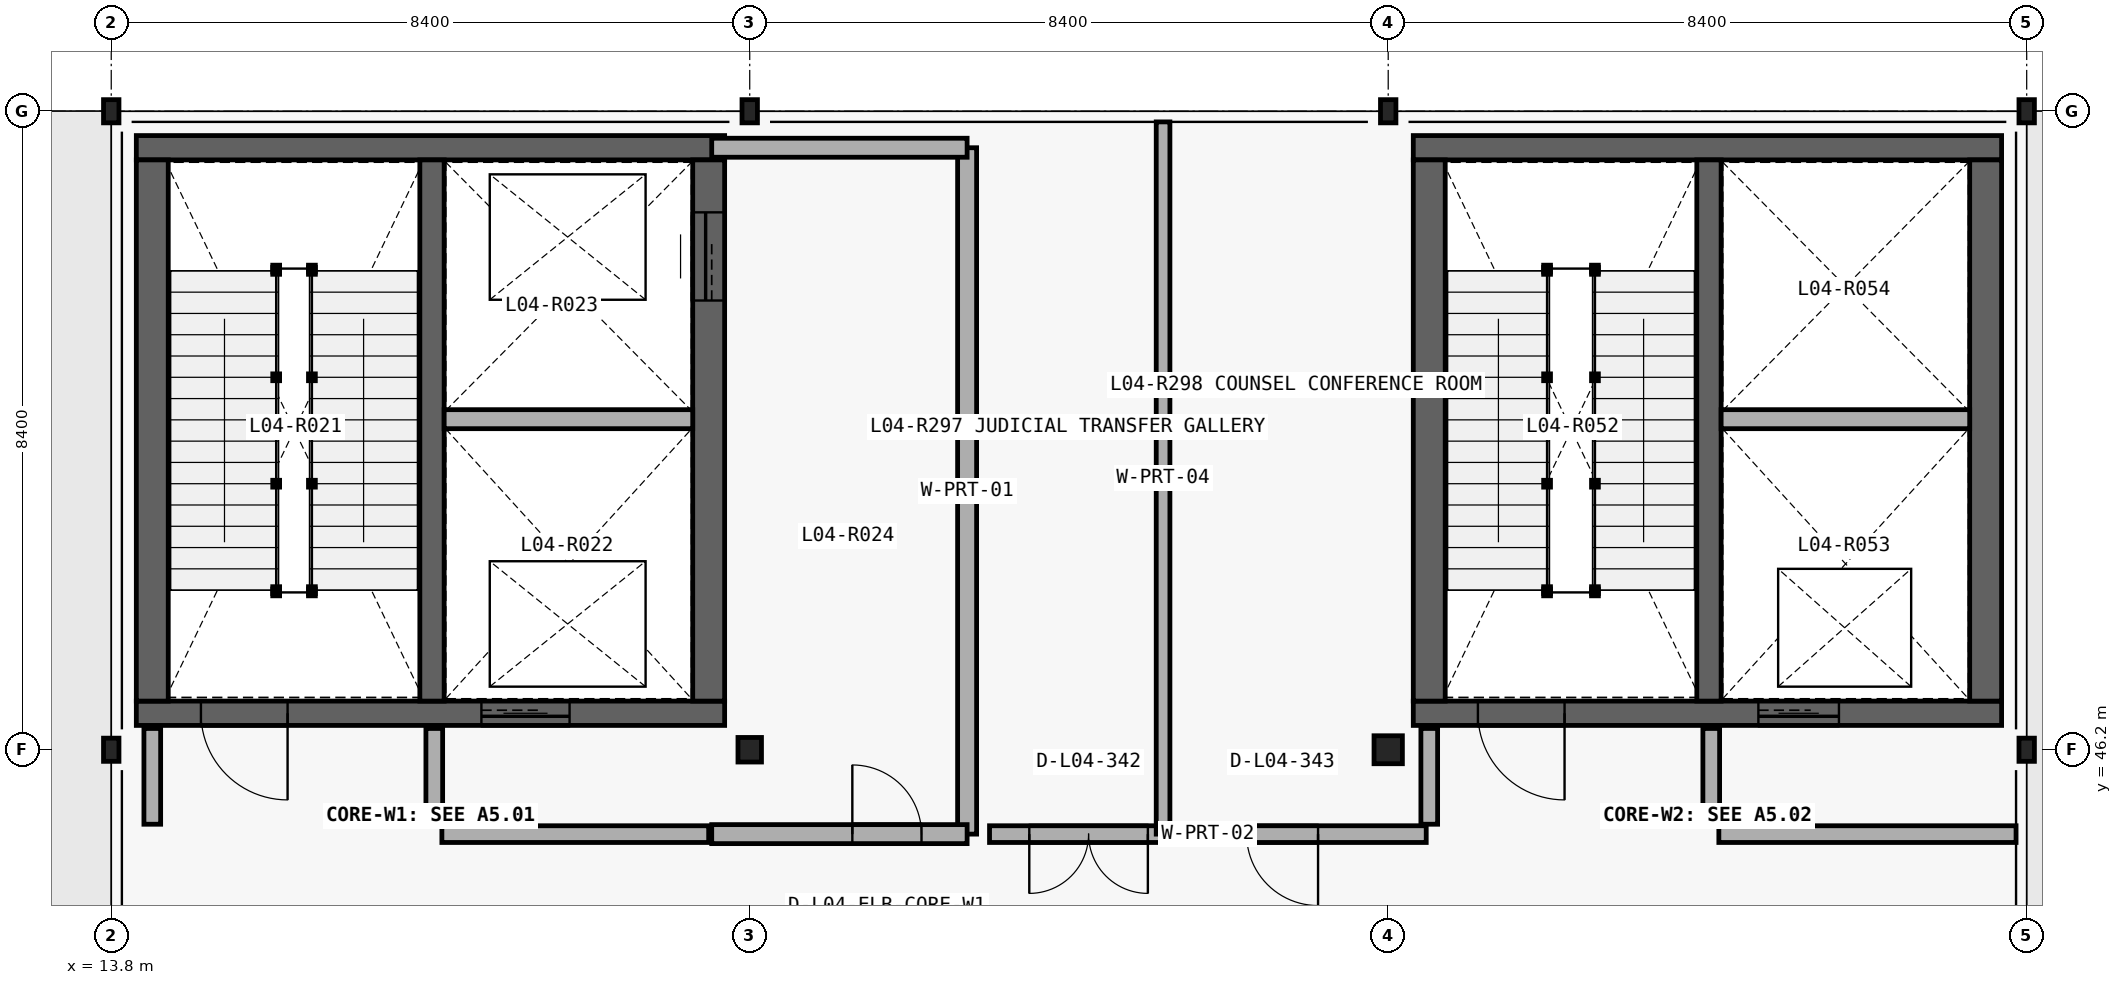
"""IFC4 building model, lengths in metres.
Left out: names, types, materials, properties, quantities, classifications, styles, units other than length and angle.
Written with IfcOpenShell. Run it as: python <this file> out.ifc"""

import sys

from ifc_helpers import new_model, si_unit, direction, frame, frame_2d, origin_with_axes, origin_2d_with_axis, place, context, subcontext, project, spatial, rectangle, hollow_rectangle, i_section, extrude, element, fill, save


model = new_model("IFC4")
c1 = context("Model", 3, precision=1e-05, world=origin_with_axes(), true_north=direction((0.0, 1.0)))
c2 = subcontext(c1, "Body", "Model", "MODEL_VIEW")
j1 = project(units=[si_unit("LENGTHUNIT", "METRE"), si_unit("PLANEANGLEUNIT", "RADIAN")], contexts=[c1])
p1 = place(None, origin_with_axes())
s1 = spatial("IfcSite", under=j1, at=p1, CompositionType="ELEMENT")
p2 = place(p1, origin_with_axes())
s2 = spatial("IfcBuilding", under=s1, at=p2, CompositionType="ELEMENT")
p3 = place(p2, frame((0.0, 0.0, 20.4), z_axis=(0.0, 0.0, 1.0), x_axis=(1.0, 0.0, 0.0)))
s3 = spatial("IfcBuildingStorey", under=s2, at=p3, CompositionType="ELEMENT", Elevation=20.4)
p4 = place(None, frame((14.13, 46.68, 20.4), z_axis=(0.0, 0.0, 1.0), x_axis=(1.0, 0.0, 0.0)))
e1 = element("IfcWall", 1, at=p4, inside=s3, PredefinedType="SHEAR", context=c2, shape_type="SweptSolid", body=[
    extrude(rectangle(XDim=7.74, YDim=0.32, at=frame_2d((3.87, 0.0), x_axis=(1.0, 0.0))), origin_with_axes(), (0.0, 0.0, 1.0), 4.5),
])
p5 = place(None, frame((15.55, 46.68, 20.4), z_axis=(0.0, 0.0, 1.0), x_axis=(1.0, 0.0, 0.0)))
e2 = element("IfcOpeningElement", 2, at=p5, cuts=e1, PredefinedType="OPENING", context=c2, shape_type="SweptSolid", body=[
    extrude(rectangle(XDim=1.14, YDim=2.18, at=frame_2d((0.0, 1.09), x_axis=(1.0, 0.0))), frame((0.0, 0.17, 0.0), z_axis=(0.0, -1.0, 0.0), x_axis=(1.0, 0.0, 0.0)), (0.0, 0.0, 1.0), 0.34),
])
p6 = place(None, frame((19.25, 46.68, 20.4), z_axis=(0.0, 0.0, 1.0), x_axis=(1.0, 0.0, 0.0)))
e3 = element("IfcOpeningElement", 3, at=p6, cuts=e1, PredefinedType="OPENING", context=c2, shape_type="SweptSolid", body=[
    extrude(rectangle(XDim=1.16, YDim=2.2, at=frame_2d((0.0, 1.1), x_axis=(1.0, 0.0))), frame((0.0, 0.17, 0.0), z_axis=(0.0, -1.0, 0.0), x_axis=(1.0, 0.0, 0.0)), (0.0, 0.0, 1.0), 0.34),
])
p7 = place(None, frame((21.87, 54.12, 20.4), z_axis=(0.0, 0.0, 1.0), x_axis=(-1.0, 0.0, 0.0)))
e4 = element("IfcWall", 4, at=p7, inside=s3, PredefinedType="SHEAR", context=c2, shape_type="SweptSolid", body=[
    extrude(rectangle(XDim=7.74, YDim=0.32, at=frame_2d((3.87, 0.0), x_axis=(1.0, 0.0))), origin_with_axes(), (0.0, 0.0, 1.0), 4.5),
])
p8 = place(None, frame((21.66, 46.84, 20.4), z_axis=(0.0, 0.0, 1.0), x_axis=(0.0, 1.0, 0.0)))
e5 = element("IfcWall", 5, at=p8, inside=s3, PredefinedType="SHEAR", context=c2, shape_type="SweptSolid", body=[
    extrude(rectangle(XDim=7.12, YDim=0.42, at=frame_2d((3.56, 0.0), x_axis=(1.0, 0.0))), origin_with_axes(), (0.0, 0.0, 1.0), 4.5),
])
p9 = place(None, frame((21.66, 52.69, 20.4), z_axis=(0.0, 0.0, 1.0), x_axis=(0.0, 1.0, 0.0)))
e6 = element("IfcOpeningElement", 6, at=p9, cuts=e5, PredefinedType="OPENING", context=c2, shape_type="SweptSolid", body=[
    extrude(rectangle(XDim=1.16, YDim=2.2, at=frame_2d((0.0, 1.1), x_axis=(1.0, 0.0))), frame((0.0, 0.22, 0.0), z_axis=(0.0, -1.0, 0.0), x_axis=(1.0, 0.0, 0.0)), (0.0, 0.0, 1.0), 0.44),
])
p10 = place(None, frame((14.34, 53.96, 20.4), z_axis=(0.0, 0.0, 1.0), x_axis=(0.0, -1.0, 0.0)))
e7 = element("IfcWall", 7, at=p10, inside=s3, PredefinedType="SHEAR", context=c2, shape_type="SweptSolid", body=[
    extrude(rectangle(XDim=7.12, YDim=0.42, at=frame_2d((3.56, 0.0), x_axis=(1.0, 0.0))), origin_with_axes(), (0.0, 0.0, 1.0), 4.5),
])
p11 = place(None, frame((18.02, 46.84, 20.4), z_axis=(0.0, 0.0, 1.0), x_axis=(0.0, 1.0, 0.0)))
e8 = element("IfcWall", 8, at=p11, inside=s3, PredefinedType="SHEAR", context=c2, shape_type="SweptSolid", body=[
    extrude(rectangle(XDim=7.12, YDim=0.32, at=frame_2d((3.56, 0.0), x_axis=(1.0, 0.0))), origin_with_axes(), (0.0, 0.0, 1.0), 4.5),
])
p12 = place(None, frame((18.18, 50.549, 20.4), z_axis=(0.0, 0.0, 1.0), x_axis=(1.0, 0.0, 0.0)))
e9 = element("IfcWall", 9, at=p12, inside=s3, PredefinedType="PARTITIONING", context=c2, shape_type="SweptSolid", body=[
    extrude(rectangle(XDim=3.27, YDim=0.25, at=frame_2d((1.635, 0.0), x_axis=(1.0, 0.0))), origin_with_axes(), (0.0, 0.0, 1.0), 4.18),
])
p13 = place(None, frame((25.06, 45.09, 20.4), z_axis=(0.0, 0.0, 1.0), x_axis=(0.0, 1.0, 0.0)))
e10 = element("IfcWall", 10, at=p13, inside=s3, PredefinedType="PARTITIONING", context=c2, shape_type="SweptSolid", body=[
    extrude(rectangle(XDim=9.03, YDim=0.25, at=frame_2d((4.515, 0.0), x_axis=(1.0, 0.0))), origin_with_axes(), (0.0, 0.0, 1.0), 4.18),
])
p14 = place(None, frame((21.7, 54.12, 20.4), z_axis=(0.0, 0.0, 1.0), x_axis=(1.0, 0.0, 0.0)))
e11 = element("IfcWall", 11, at=p14, inside=s3, PredefinedType="PARTITIONING", context=c2, shape_type="SweptSolid", body=[
    extrude(rectangle(XDim=3.36, YDim=0.25, at=frame_2d((1.68, 0.0), x_axis=(1.0, 0.0))), origin_with_axes(), (0.0, 0.0, 1.0), 4.18),
])
p15 = place(None, frame((21.7, 45.09, 20.4), z_axis=(0.0, 0.0, 1.0), x_axis=(1.0, 0.0, 0.0)))
e12 = element("IfcWall", 12, at=p15, inside=s3, PredefinedType="PARTITIONING", context=c2, shape_type="SweptSolid", body=[
    extrude(rectangle(XDim=3.36, YDim=0.25, at=frame_2d((1.68, 0.0), x_axis=(1.0, 0.0))), origin_with_axes(), (0.0, 0.0, 1.0), 4.18),
])
p16 = place(None, frame((24.005, 45.09, 20.4), z_axis=(0.0, 0.0, 1.0), x_axis=(1.0, 0.0, 0.0)))
e13 = element("IfcOpeningElement", 13, at=p16, cuts=e12, PredefinedType="OPENING", context=c2, shape_type="SweptSolid", body=[
    extrude(rectangle(XDim=0.91, YDim=2.12, at=frame_2d((0.0, 1.06), x_axis=(1.0, 0.0))), frame((0.0, 0.135, 0.0), z_axis=(0.0, -1.0, 0.0), x_axis=(1.0, 0.0, 0.0)), (0.0, 0.0, 1.0), 0.27),
])
p17 = place(None, frame((30.93, 46.68, 20.4), z_axis=(0.0, 0.0, 1.0), x_axis=(1.0, 0.0, 0.0)))
e14 = element("IfcWall", 14, at=p17, inside=s3, PredefinedType="SHEAR", context=c2, shape_type="SweptSolid", body=[
    extrude(rectangle(XDim=7.74, YDim=0.32, at=frame_2d((3.87, 0.0), x_axis=(1.0, 0.0))), origin_with_axes(), (0.0, 0.0, 1.0), 4.5),
])
p18 = place(None, frame((32.35, 46.68, 20.4), z_axis=(0.0, 0.0, 1.0), x_axis=(1.0, 0.0, 0.0)))
e15 = element("IfcOpeningElement", 15, at=p18, cuts=e14, PredefinedType="OPENING", context=c2, shape_type="SweptSolid", body=[
    extrude(rectangle(XDim=1.14, YDim=2.18, at=frame_2d((0.0, 1.09), x_axis=(1.0, 0.0))), frame((0.0, 0.17, 0.0), z_axis=(0.0, -1.0, 0.0), x_axis=(1.0, 0.0, 0.0)), (0.0, 0.0, 1.0), 0.34),
])
p19 = place(None, frame((36.0, 46.68, 20.4), z_axis=(0.0, 0.0, 1.0), x_axis=(1.0, 0.0, 0.0)))
e16 = element("IfcOpeningElement", 16, at=p19, cuts=e14, PredefinedType="OPENING", context=c2, shape_type="SweptSolid", body=[
    extrude(rectangle(XDim=1.06, YDim=2.16, at=frame_2d((0.0, 1.08), x_axis=(1.0, 0.0))), frame((0.0, 0.17, 0.0), z_axis=(0.0, -1.0, 0.0), x_axis=(1.0, 0.0, 0.0)), (0.0, 0.0, 1.0), 0.34),
])
p20 = place(None, frame((38.67, 54.12, 20.4), z_axis=(0.0, 0.0, 1.0), x_axis=(-1.0, 0.0, 0.0)))
e17 = element("IfcWall", 17, at=p20, inside=s3, PredefinedType="SHEAR", context=c2, shape_type="SweptSolid", body=[
    extrude(rectangle(XDim=7.74, YDim=0.32, at=frame_2d((3.87, 0.0), x_axis=(1.0, 0.0))), origin_with_axes(), (0.0, 0.0, 1.0), 4.5),
])
for number, where, z_axis, x_axis in (
    (18, (38.46, 46.84, 20.4), (0.0, 0.0, 1.0), (0.0, 1.0, 0.0)),
    (19, (31.14, 53.96, 20.4), (0.0, 0.0, 1.0), (0.0, -1.0, 0.0)),
):
    element("IfcWall", number, at=place(None, frame(where, z_axis=z_axis, x_axis=x_axis)), inside=s3, PredefinedType="SHEAR", context=c2, shape_type="SweptSolid", body=[
        extrude(rectangle(XDim=7.12, YDim=0.42, at=frame_2d((3.56, 0.0), x_axis=(1.0, 0.0))), origin_with_axes(), (0.0, 0.0, 1.0), 4.5),
    ])
p21 = place(None, frame((34.82, 46.84, 20.4), z_axis=(0.0, 0.0, 1.0), x_axis=(0.0, 1.0, 0.0)))
e20 = element("IfcWall", 20, at=p21, inside=s3, PredefinedType="SHEAR", context=c2, shape_type="SweptSolid", body=[
    extrude(rectangle(XDim=7.12, YDim=0.32, at=frame_2d((3.56, 0.0), x_axis=(1.0, 0.0))), origin_with_axes(), (0.0, 0.0, 1.0), 4.5),
])
p22 = place(None, frame((34.98, 50.549, 20.4), z_axis=(0.0, 0.0, 1.0), x_axis=(1.0, 0.0, 0.0)))
e21 = element("IfcWall", 21, at=p22, inside=s3, PredefinedType="PARTITIONING", context=c2, shape_type="SweptSolid", body=[
    extrude(rectangle(XDim=3.27, YDim=0.25, at=frame_2d((1.635, 0.0), x_axis=(1.0, 0.0))), origin_with_axes(), (0.0, 0.0, 1.0), 4.18),
])
for number, where, z_axis, x_axis in (
    (22, (14.34, 45.22, 20.4), (0.0, 0.0, 1.0), (0.0, 1.0, 0.0)),
    (23, (18.05, 45.22, 20.4), (0.0, 0.0, 1.0), (0.0, 1.0, 0.0)),
    (24, (31.14, 45.22, 20.4), (0.0, 0.0, 1.0), (0.0, 1.0, 0.0)),
    (25, (34.85, 45.22, 20.4), (0.0, 0.0, 1.0), (0.0, 1.0, 0.0)),
):
    element("IfcWall", number, at=place(None, frame(where, z_axis=z_axis, x_axis=x_axis)), inside=s3, PredefinedType="PARTITIONING", context=c2, shape_type="SweptSolid", body=[
        extrude(rectangle(XDim=1.26, YDim=0.22, at=frame_2d((0.63, 0.0), x_axis=(1.0, 0.0))), origin_with_axes(), (0.0, 0.0, 1.0), 4.18),
    ])
p23 = place(None, frame((18.15, 45.09, 20.4), z_axis=(0.0, 0.0, 1.0), x_axis=(1.0, 0.0, 0.0)))
e26 = element("IfcWall", 26, at=p23, inside=s3, PredefinedType="PARTITIONING", context=c2, shape_type="SweptSolid", body=[
    extrude(rectangle(XDim=3.51, YDim=0.22, at=frame_2d((1.755, 0.0), x_axis=(1.0, 0.0))), origin_with_axes(), (0.0, 0.0, 1.0), 4.18),
])
p24 = place(None, frame((25.355, 45.09, 20.4), z_axis=(0.0, 0.0, 1.0), x_axis=(1.0, 0.0, 0.0)))
e27 = element("IfcWall", 27, at=p24, inside=s3, PredefinedType="PARTITIONING", context=c2, shape_type="SweptSolid", body=[
    extrude(rectangle(XDim=5.745, YDim=0.22, at=frame_2d((2.873, 0.0), x_axis=(1.0, 0.0))), origin_with_axes(), (0.0, 0.0, 1.0), 4.18),
])
p25 = place(None, frame((26.658, 45.09, 20.4), z_axis=(0.0, 0.0, 1.0), x_axis=(1.0, 0.0, 0.0)))
e28 = element("IfcOpeningElement", 28, at=p25, cuts=e27, PredefinedType="OPENING", context=c2, shape_type="SweptSolid", body=[
    extrude(rectangle(XDim=1.56, YDim=2.28, at=frame_2d((0.0, 1.14), x_axis=(1.0, 0.0))), frame((0.0, 0.12, 0.0), z_axis=(0.0, -1.0, 0.0), x_axis=(1.0, 0.0, 0.0)), (0.0, 0.0, 1.0), 0.24),
])
p26 = place(None, frame((29.207, 45.09, 20.4), z_axis=(0.0, 0.0, 1.0), x_axis=(1.0, 0.0, 0.0)))
e29 = element("IfcOpeningElement", 29, at=p26, cuts=e27, PredefinedType="OPENING", context=c2, shape_type="SweptSolid", body=[
    extrude(rectangle(XDim=0.94, YDim=2.3, at=frame_2d((0.0, 1.15), x_axis=(1.0, 0.0))), frame((0.0, 0.12, 0.0), z_axis=(0.0, -1.0, 0.0), x_axis=(1.0, 0.0, 0.0)), (0.0, 0.0, 1.0), 0.24),
])
p27 = place(None, frame((34.95, 45.09, 20.4), z_axis=(0.0, 0.0, 1.0), x_axis=(1.0, 0.0, 0.0)))
e30 = element("IfcWall", 30, at=p27, inside=s3, PredefinedType="PARTITIONING", context=c2, shape_type="SweptSolid", body=[
    extrude(rectangle(XDim=3.91, YDim=0.22, at=frame_2d((1.955, 0.0), x_axis=(1.0, 0.0))), origin_with_axes(), (0.0, 0.0, 1.0), 4.18),
])
p28 = place(None, frame((27.638, 45.09, 20.4), z_axis=(0.0, 0.0, 1.0), x_axis=(0.0, 1.0, 0.0)))
e31 = element("IfcWall", 31, at=p28, inside=s3, PredefinedType="PARTITIONING", context=c2, shape_type="SweptSolid", body=[
    extrude(rectangle(XDim=9.37, YDim=0.18, at=frame_2d((4.685, 0.0), x_axis=(1.0, 0.0))), origin_with_axes(), (0.0, 0.0, 1.0), 4.18),
])
for number, where, z_axis, x_axis in (
    (32, (13.8, 46.2, 20.4), (0.0, 0.0, 1.0), (1.0, 0.0, 0.0)),
    (33, (13.8, 54.6, 20.4), (0.0, 0.0, 1.0), (1.0, 0.0, 0.0)),
):
    element("IfcColumn", number, at=place(None, frame(where, z_axis=z_axis, x_axis=x_axis)), inside=s3, PredefinedType="COLUMN", context=c2, shape_type="SweptSolid", body=[
        extrude(hollow_rectangle(XDim=0.203, YDim=0.305, WallThickness=0.013, InnerFilletRadius=0.025, OuterFilletRadius=0.013, at=origin_2d_with_axis()), origin_with_axes(), (0.0, 0.0, 1.0), 4.5),
    ])
p29 = place(None, frame((22.2, 46.2, 20.4), z_axis=(0.0, 0.0, 1.0), x_axis=(1.0, 0.0, 0.0)))
e34 = element("IfcColumn", 34, at=p29, inside=s3, PredefinedType="COLUMN", context=c2, shape_type="SweptSolid", body=[
    extrude(i_section(OverallWidth=0.309, OverallDepth=0.323, WebThickness=0.014, FlangeThickness=0.023, at=origin_2d_with_axis()), origin_with_axes(), (0.0, 0.0, 1.0), 4.5),
])
p30 = place(None, frame((22.2, 54.6, 20.4), z_axis=(0.0, 0.0, 1.0), x_axis=(1.0, 0.0, 0.0)))
e35 = element("IfcColumn", 35, at=p30, inside=s3, PredefinedType="COLUMN", context=c2, shape_type="SweptSolid", body=[
    extrude(hollow_rectangle(XDim=0.203, YDim=0.305, WallThickness=0.013, InnerFilletRadius=0.025, OuterFilletRadius=0.013, at=origin_2d_with_axis()), origin_with_axes(), (0.0, 0.0, 1.0), 4.5),
])
p31 = place(None, frame((30.6, 46.2, 20.4), z_axis=(0.0, 0.0, 1.0), x_axis=(1.0, 0.0, 0.0)))
e36 = element("IfcColumn", 36, at=p31, inside=s3, PredefinedType="COLUMN", context=c2, shape_type="SweptSolid", body=[
    extrude(i_section(OverallWidth=0.373, OverallDepth=0.368, WebThickness=0.015, FlangeThickness=0.024, at=origin_2d_with_axis()), origin_with_axes(), (0.0, 0.0, 1.0), 4.5),
])
for number, where, z_axis, x_axis in (
    (37, (30.6, 54.6, 20.4), (0.0, 0.0, 1.0), (1.0, 0.0, 0.0)),
    (38, (39.0, 46.2, 20.4), (0.0, 0.0, 1.0), (1.0, 0.0, 0.0)),
    (39, (39.0, 54.6, 20.4), (0.0, 0.0, 1.0), (1.0, 0.0, 0.0)),
):
    element("IfcColumn", number, at=place(None, frame(where, z_axis=z_axis, x_axis=x_axis)), inside=s3, PredefinedType="COLUMN", context=c2, shape_type="SweptSolid", body=[
        extrude(hollow_rectangle(XDim=0.203, YDim=0.305, WallThickness=0.013, InnerFilletRadius=0.025, OuterFilletRadius=0.013, at=origin_2d_with_axis()), origin_with_axes(), (0.0, 0.0, 1.0), 4.5),
    ])
p32 = place(None, frame((15.55, 46.68, 20.4), z_axis=(0.0, 0.0, 1.0), x_axis=(-1.0, 0.0, 0.0)))
e40 = element("IfcDoor", 40, at=p32, inside=s3, OperationType="SINGLE_SWING_RIGHT", PredefinedType="DOOR", context=c2, shape_type="SweptSolid", body=[
    extrude(rectangle(XDim=1.14, YDim=2.18, at=frame_2d((0.0, 1.09), x_axis=(1.0, 0.0))), frame((0.0, 0.04, 0.0), z_axis=(0.0, -1.0, 0.0), x_axis=(1.0, 0.0, 0.0)), (0.0, 0.0, 1.0), 0.08),
])
fill(e2, e40)
p33 = place(None, frame((19.25, 46.68, 20.4), z_axis=(0.0, 0.0, 1.0), x_axis=(-1.0, 0.0, 0.0)))
e41 = element("IfcDoor", 41, at=p33, inside=s3, OperationType="SLIDING_TO_LEFT", PredefinedType="DOOR", context=c2, shape_type="SweptSolid", body=[
    extrude(rectangle(XDim=1.16, YDim=2.2, at=frame_2d((0.0, 1.1), x_axis=(1.0, 0.0))), frame((0.0, 0.04, 0.0), z_axis=(0.0, -1.0, 0.0), x_axis=(1.0, 0.0, 0.0)), (0.0, 0.0, 1.0), 0.08),
])
fill(e3, e41)
p34 = place(None, frame((21.66, 52.69, 20.4), z_axis=(0.0, 0.0, 1.0), x_axis=(0.0, 1.0, 0.0)))
e42 = element("IfcDoor", 42, at=p34, inside=s3, OperationType="SLIDING_TO_LEFT", PredefinedType="DOOR", context=c2, shape_type="SweptSolid", body=[
    extrude(rectangle(XDim=1.16, YDim=2.2, at=frame_2d((0.0, 1.1), x_axis=(1.0, 0.0))), frame((0.0, 0.04, 0.0), z_axis=(0.0, -1.0, 0.0), x_axis=(1.0, 0.0, 0.0)), (0.0, 0.0, 1.0), 0.08),
])
fill(e6, e42)
p35 = place(None, frame((24.005, 45.09, 20.4), z_axis=(0.0, 0.0, 1.0), x_axis=(1.0, 0.0, 0.0)))
e43 = element("IfcDoor", 43, at=p35, inside=s3, OperationType="SINGLE_SWING_LEFT", PredefinedType="DOOR", context=c2, shape_type="SweptSolid", body=[
    extrude(rectangle(XDim=0.91, YDim=2.12, at=frame_2d((0.0, 1.06), x_axis=(1.0, 0.0))), frame((0.0, 0.04, 0.0), z_axis=(0.0, -1.0, 0.0), x_axis=(1.0, 0.0, 0.0)), (0.0, 0.0, 1.0), 0.08),
])
fill(e13, e43)
p36 = place(None, frame((32.35, 46.68, 20.4), z_axis=(0.0, 0.0, 1.0), x_axis=(-1.0, 0.0, 0.0)))
e44 = element("IfcDoor", 44, at=p36, inside=s3, OperationType="SINGLE_SWING_RIGHT", PredefinedType="DOOR", context=c2, shape_type="SweptSolid", body=[
    extrude(rectangle(XDim=1.14, YDim=2.18, at=frame_2d((0.0, 1.09), x_axis=(1.0, 0.0))), frame((0.0, 0.04, 0.0), z_axis=(0.0, -1.0, 0.0), x_axis=(1.0, 0.0, 0.0)), (0.0, 0.0, 1.0), 0.08),
])
fill(e15, e44)
p37 = place(None, frame((36.0, 46.68, 20.4), z_axis=(0.0, 0.0, 1.0), x_axis=(-1.0, 0.0, 0.0)))
e45 = element("IfcDoor", 45, at=p37, inside=s3, OperationType="SLIDING_TO_LEFT", PredefinedType="DOOR", context=c2, shape_type="SweptSolid", body=[
    extrude(rectangle(XDim=1.06, YDim=2.16, at=frame_2d((0.0, 1.08), x_axis=(1.0, 0.0))), frame((0.0, 0.04, 0.0), z_axis=(0.0, -1.0, 0.0), x_axis=(1.0, 0.0, 0.0)), (0.0, 0.0, 1.0), 0.08),
])
fill(e16, e45)
p38 = place(None, frame((26.658, 45.09, 20.4), z_axis=(0.0, 0.0, 1.0), x_axis=(-1.0, 0.0, 0.0)))
e46 = element("IfcDoor", 46, at=p38, inside=s3, OperationType="DOUBLE_DOOR_SINGLE_SWING", PredefinedType="DOOR", context=c2, shape_type="SweptSolid", body=[
    extrude(rectangle(XDim=1.56, YDim=2.28, at=frame_2d((0.0, 1.14), x_axis=(1.0, 0.0))), frame((0.0, 0.04, 0.0), z_axis=(0.0, -1.0, 0.0), x_axis=(1.0, 0.0, 0.0)), (0.0, 0.0, 1.0), 0.08),
])
fill(e28, e46)
p39 = place(None, frame((29.207, 45.09, 20.4), z_axis=(0.0, 0.0, 1.0), x_axis=(-1.0, 0.0, 0.0)))
e47 = element("IfcDoor", 47, at=p39, inside=s3, OperationType="SINGLE_SWING_RIGHT", PredefinedType="DOOR", context=c2, shape_type="SweptSolid", body=[
    extrude(rectangle(XDim=0.94, YDim=2.3, at=frame_2d((0.0, 1.15), x_axis=(1.0, 0.0))), frame((0.0, 0.04, 0.0), z_axis=(0.0, -1.0, 0.0), x_axis=(1.0, 0.0, 0.0)), (0.0, 0.0, 1.0), 0.08),
])
fill(e29, e47)
save(model, sys.argv[1])
